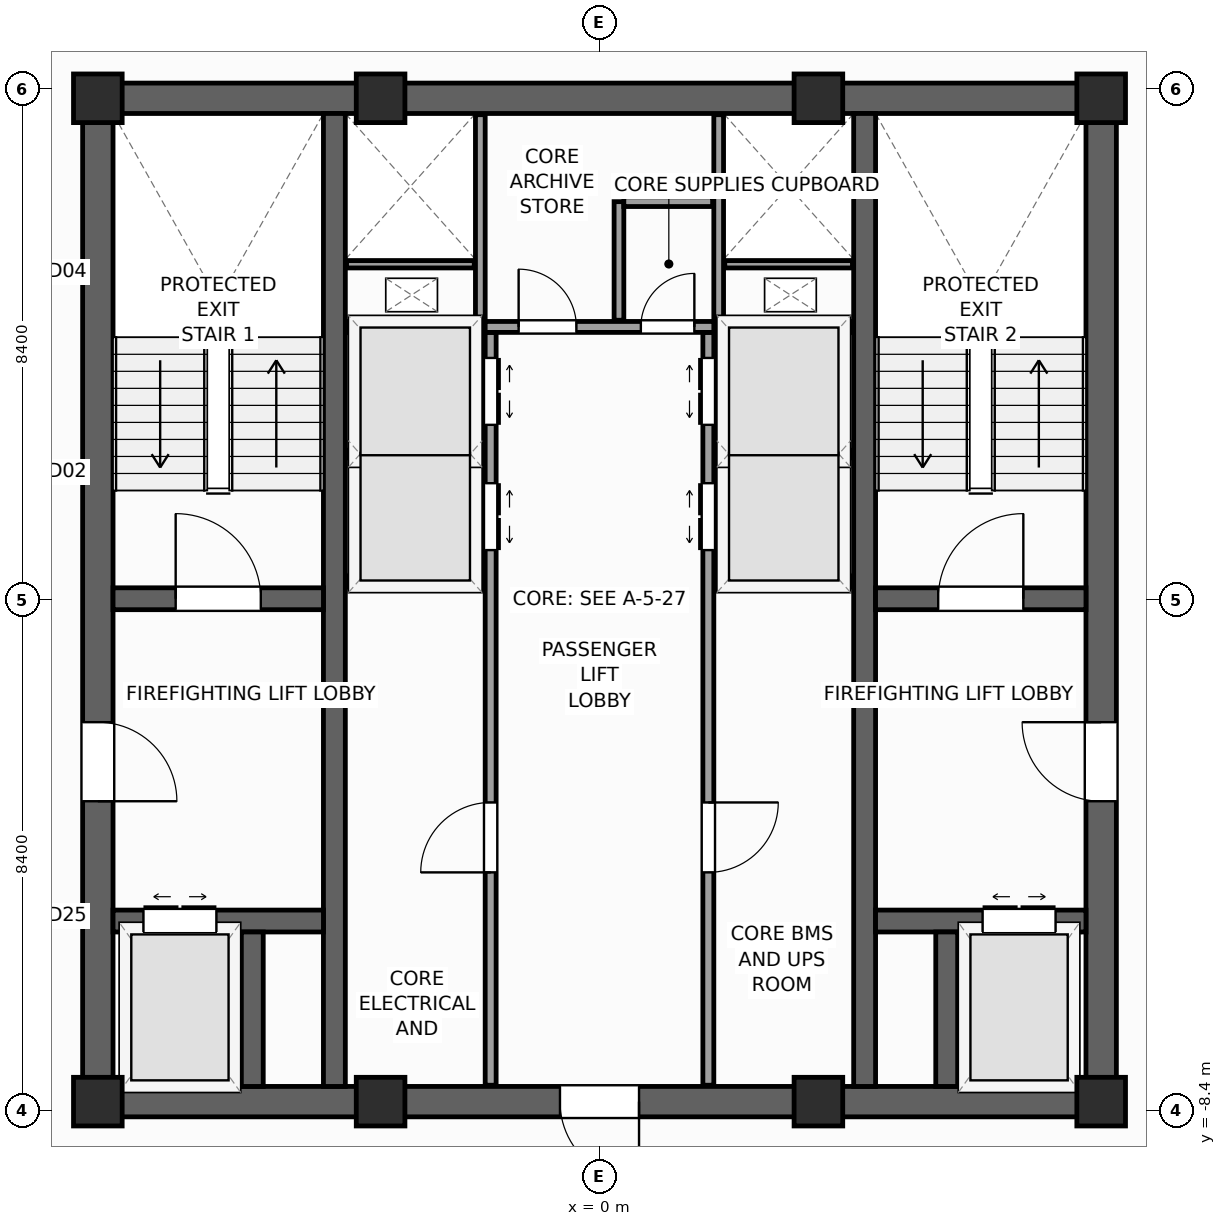
"""IFC4 building model, lengths in metres.
Left out: names, types, materials, properties, quantities, classifications, styles, units other than length and angle.
Written with IfcOpenShell. Run it as: python <this file> out.ifc"""

import sys

from ifc_helpers import new_model, si_unit, direction, frame, frame_2d, origin, origin_2d, place, context, subcontext, project, spatial, rectangle, extrude, source, transform, mapped, element, fill, save


model = new_model("IFC4")
c1 = context("Model", 3, precision=1e-05, world=origin(), true_north=direction((0.0, 1.0)))
c2 = subcontext(c1, "Body", "Model", "MODEL_VIEW")
j1 = project(units=[si_unit("LENGTHUNIT", "METRE"), si_unit("PLANEANGLEUNIT", "RADIAN")], contexts=[c1])
p1 = place(None, origin())
s1 = spatial("IfcSite", under=j1, at=p1, CompositionType="ELEMENT")
p2 = place(p1, origin())
s2 = spatial("IfcBuilding", under=s1, at=p2, CompositionType="ELEMENT")
p3 = place(p2, frame((0.0, 0.0, 297.6)))
s3 = spatial("IfcBuildingStorey", under=s2, at=p3, CompositionType="ELEMENT", Elevation=297.6)
p4 = place(p3, frame((-8.5, -8.25, 0.0), z_axis=(0.0, 0.0, 1.0), x_axis=(1.0, 0.0, 0.0)))
e1 = element("IfcWall", 1, at=p4, inside=s3, PredefinedType="SHEAR", context=c2, shape_type="SweptSolid", body=[
    extrude(rectangle(XDim=17.0, YDim=0.5, at=frame_2d((8.5, 0.0))), origin(), (0.0, 0.0, 1.0), 3.6),
])
p5 = place(p4, frame((7.85, 0.0, 0.0)))
e2 = element("IfcOpeningElement", 2, at=p5, cuts=e1, PredefinedType="OPENING", context=c2, shape_type="SweptSolid", body=[
    extrude(rectangle(XDim=1.3, YDim=2.2, at=frame_2d((0.65, 1.1))), frame((0.0, 0.26, 0.0), z_axis=(0.0, -1.0, 0.0), x_axis=(1.0, 0.0, 0.0)), (0.0, 0.0, 1.0), 0.52),
])
p6 = place(p3, frame((-8.5, 8.25, 0.0), z_axis=(0.0, 0.0, 1.0), x_axis=(1.0, 0.0, 0.0)))
e3 = element("IfcWall", 3, at=p6, inside=s3, PredefinedType="SHEAR", context=c2, shape_type="SweptSolid", body=[
    extrude(rectangle(XDim=17.0, YDim=0.5, at=frame_2d((8.5, 0.0))), origin(), (0.0, 0.0, 1.0), 3.6),
])
p7 = place(p3, frame((-8.25, -8.0, 0.0), z_axis=(0.0, 0.0, 1.0), x_axis=(0.0, 1.0, 0.0)))
e4 = element("IfcWall", 4, at=p7, inside=s3, PredefinedType="SHEAR", context=c2, shape_type="SweptSolid", body=[
    extrude(rectangle(XDim=16.0, YDim=0.5, at=frame_2d((8.0, 0.0))), origin(), (0.0, 0.0, 1.0), 3.6),
])
p8 = place(p7, frame((4.69, 0.0, 0.0)))
e5 = element("IfcOpeningElement", 5, at=p8, cuts=e4, PredefinedType="OPENING", context=c2, shape_type="SweptSolid", body=[
    extrude(rectangle(XDim=1.3, YDim=2.2, at=frame_2d((0.65, 1.1))), frame((0.0, 0.26, 0.0), z_axis=(0.0, -1.0, 0.0), x_axis=(1.0, 0.0, 0.0)), (0.0, 0.0, 1.0), 0.52),
])
p9 = place(p3, frame((8.25, -8.0, 0.0), z_axis=(0.0, 0.0, 1.0), x_axis=(0.0, 1.0, 0.0)))
e6 = element("IfcWall", 6, at=p9, inside=s3, PredefinedType="SHEAR", context=c2, shape_type="SweptSolid", body=[
    extrude(rectangle(XDim=16.0, YDim=0.5, at=frame_2d((8.0, 0.0))), origin(), (0.0, 0.0, 1.0), 3.6),
])
p10 = place(p9, frame((4.69, 0.0, 0.0)))
e7 = element("IfcOpeningElement", 7, at=p10, cuts=e6, PredefinedType="OPENING", context=c2, shape_type="SweptSolid", body=[
    extrude(rectangle(XDim=1.3, YDim=2.2, at=frame_2d((0.65, 1.1))), frame((0.0, 0.26, 0.0), z_axis=(0.0, -1.0, 0.0), x_axis=(1.0, 0.0, 0.0)), (0.0, 0.0, 1.0), 0.52),
])
for number, where, z_axis, x_axis in (
    (8, (-4.36, -8.0, 0.0), (0.0, 0.0, 1.0), (0.0, 1.0, 0.0)),
    (9, (4.36, -8.0, 0.0), (0.0, 0.0, 1.0), (0.0, 1.0, 0.0)),
):
    element("IfcWall", number, at=place(p3, frame(where, z_axis=z_axis, x_axis=x_axis)), inside=s3, PredefinedType="SHEAR", context=c2, shape_type="SweptSolid", body=[
        extrude(rectangle(XDim=16.0, YDim=0.36, at=frame_2d((8.0, 0.0))), origin(), (0.0, 0.0, 1.0), 3.6),
    ])
p11 = place(p3, frame((-8.0, 0.02, 0.0), z_axis=(0.0, 0.0, 1.0), x_axis=(1.0, 0.0, 0.0)))
e10 = element("IfcWall", 10, at=p11, inside=s3, PredefinedType="SHEAR", context=c2, shape_type="SweptSolid", body=[
    extrude(rectangle(XDim=3.46, YDim=0.36, at=frame_2d((1.73, 0.0))), origin(), (0.0, 0.0, 1.0), 3.6),
])
p12 = place(p11, frame((1.03, 0.0, 0.0)))
e11 = element("IfcOpeningElement", 11, at=p12, cuts=e10, PredefinedType="OPENING", context=c2, shape_type="SweptSolid", body=[
    extrude(rectangle(XDim=1.4, YDim=2.2, at=frame_2d((0.7, 1.1))), frame((0.0, 0.19, 0.0), z_axis=(0.0, -1.0, 0.0), x_axis=(1.0, 0.0, 0.0)), (0.0, 0.0, 1.0), 0.38),
])
p13 = place(p3, frame((4.54, 0.02, 0.0), z_axis=(0.0, 0.0, 1.0), x_axis=(1.0, 0.0, 0.0)))
e12 = element("IfcWall", 12, at=p13, inside=s3, PredefinedType="SHEAR", context=c2, shape_type="SweptSolid", body=[
    extrude(rectangle(XDim=3.46, YDim=0.36, at=frame_2d((1.73, 0.0))), origin(), (0.0, 0.0, 1.0), 3.6),
])
p14 = place(p13, frame((1.03, 0.0, 0.0)))
e13 = element("IfcOpeningElement", 13, at=p14, cuts=e12, PredefinedType="OPENING", context=c2, shape_type="SweptSolid", body=[
    extrude(rectangle(XDim=1.4, YDim=2.2, at=frame_2d((0.7, 1.1))), frame((0.0, 0.19, 0.0), z_axis=(0.0, -1.0, 0.0), x_axis=(1.0, 0.0, 0.0)), (0.0, 0.0, 1.0), 0.38),
])
p15 = place(p3, frame((-8.0, -5.28, 0.0), z_axis=(0.0, 0.0, 1.0), x_axis=(1.0, 0.0, 0.0)))
e14 = element("IfcWall", 14, at=p15, inside=s3, PredefinedType="SHEAR", context=c2, shape_type="SweptSolid", body=[
    extrude(rectangle(XDim=3.46, YDim=0.36, at=frame_2d((1.73, 0.0))), origin(), (0.0, 0.0, 1.0), 3.6),
])
p16 = place(p15, frame((0.5, 0.0, 0.0)))
e15 = element("IfcOpeningElement", 15, at=p16, cuts=e14, PredefinedType="OPENING", context=c2, shape_type="SweptSolid", body=[
    extrude(rectangle(XDim=1.2, YDim=2.25, at=frame_2d((0.6, 1.125))), frame((0.0, 0.19, 0.0), z_axis=(0.0, -1.0, 0.0), x_axis=(1.0, 0.0, 0.0)), (0.0, 0.0, 1.0), 0.38),
])
p17 = place(p3, frame((4.54, -5.28, 0.0), z_axis=(0.0, 0.0, 1.0), x_axis=(1.0, 0.0, 0.0)))
e16 = element("IfcWall", 16, at=p17, inside=s3, PredefinedType="SHEAR", context=c2, shape_type="SweptSolid", body=[
    extrude(rectangle(XDim=3.46, YDim=0.36, at=frame_2d((1.73, 0.0))), origin(), (0.0, 0.0, 1.0), 3.6),
])
p18 = place(p17, frame((1.76, 0.0, 0.0)))
e17 = element("IfcOpeningElement", 17, at=p18, cuts=e16, PredefinedType="OPENING", context=c2, shape_type="SweptSolid", body=[
    extrude(rectangle(XDim=1.2, YDim=2.25, at=frame_2d((0.6, 1.125))), frame((0.0, 0.19, 0.0), z_axis=(0.0, -1.0, 0.0), x_axis=(1.0, 0.0, 0.0)), (0.0, 0.0, 1.0), 0.38),
])
for number, where, z_axis, x_axis in (
    (18, (-5.71, -8.0, 0.0), (0.0, 0.0, 1.0), (0.0, 1.0, 0.0)),
    (19, (5.71, -8.0, 0.0), (0.0, 0.0, 1.0), (0.0, 1.0, 0.0)),
):
    element("IfcWall", number, at=place(p3, frame(where, z_axis=z_axis, x_axis=x_axis)), inside=s3, PredefinedType="SHEAR", context=c2, shape_type="SweptSolid", body=[
        extrude(rectangle(XDim=2.54, YDim=0.36, at=frame_2d((1.27, 0.0))), origin(), (0.0, 0.0, 1.0), 3.6),
    ])
m1 = source(origin(), c2, "Body", "SweptSolid", [
    extrude(rectangle(XDim=0.8, YDim=0.8, at=origin_2d()), origin(), (0.0, 0.0, 1.0), 3.6),
])
for number, where, z_axis, x_axis in (
    (20, (-8.25, -8.25, 0.0), (0.0, 0.0, 1.0), (1.0, 0.0, 0.0)),
    (21, (8.25, -8.25, 0.0), (0.0, 0.0, 1.0), (1.0, 0.0, 0.0)),
    (22, (8.25, 8.25, 0.0), (0.0, 0.0, 1.0), (1.0, 0.0, 0.0)),
    (23, (-8.25, 8.25, 0.0), (0.0, 0.0, 1.0), (1.0, 0.0, 0.0)),
    (24, (-3.6, -8.25, 0.0), (0.0, 0.0, 1.0), (1.0, 0.0, 0.0)),
    (25, (3.6, -8.25, 0.0), (0.0, 0.0, 1.0), (1.0, 0.0, 0.0)),
    (26, (-3.6, 8.25, 0.0), (0.0, 0.0, 1.0), (1.0, 0.0, 0.0)),
    (27, (3.6, 8.25, 0.0), (0.0, 0.0, 1.0), (1.0, 0.0, 0.0)),
):
    element("IfcColumn", number, at=place(p3, frame(where, z_axis=z_axis, x_axis=x_axis)), inside=s3, PredefinedType="PILASTER", context=c2, shape_type="MappedRepresentation", body=[
        mapped(m1, transform((0.0, 0.0, 0.0), scale=1.0)),
    ])
p19 = place(p3, frame((-1.79, -7.98, 0.0), z_axis=(0.0, 0.0, 1.0), x_axis=(0.0, 1.0, 0.0)))
e28 = element("IfcWall", 28, at=p19, inside=s3, PredefinedType="PARTITIONING", context=c2, shape_type="SweptSolid", body=[
    extrude(rectangle(XDim=12.38, YDim=0.18, at=frame_2d((6.19, 0.0))), origin(), (0.0, 0.0, 1.0), 3.35),
])
p20 = place(p19, frame((8.8, 0.0, 0.0)))
e29 = element("IfcOpeningElement", 29, at=p20, cuts=e28, PredefinedType="OPENING", context=c2, shape_type="SweptSolid", body=[
    extrude(rectangle(XDim=1.1, YDim=2.2, at=frame_2d((0.55, 1.1))), frame((0.0, 0.1, 0.0), z_axis=(0.0, -1.0, 0.0), x_axis=(1.0, 0.0, 0.0)), (0.0, 0.0, 1.0), 0.2),
])
p21 = place(p19, frame((10.86, 0.0, 0.0)))
e30 = element("IfcOpeningElement", 30, at=p21, cuts=e28, PredefinedType="OPENING", context=c2, shape_type="SweptSolid", body=[
    extrude(rectangle(XDim=1.1, YDim=2.2, at=frame_2d((0.55, 1.1))), frame((0.0, 0.1, 0.0), z_axis=(0.0, -1.0, 0.0), x_axis=(1.0, 0.0, 0.0)), (0.0, 0.0, 1.0), 0.2),
])
p22 = place(p19, frame((3.5, 0.0, 0.0)))
e31 = element("IfcOpeningElement", 31, at=p22, cuts=e28, PredefinedType="OPENING", context=c2, shape_type="SweptSolid", body=[
    extrude(rectangle(XDim=1.15, YDim=2.25, at=frame_2d((0.575, 1.125))), frame((0.0, 0.1, 0.0), z_axis=(0.0, -1.0, 0.0), x_axis=(1.0, 0.0, 0.0)), (0.0, 0.0, 1.0), 0.2),
])
p23 = place(p3, frame((1.79, -7.98, 0.0), z_axis=(0.0, 0.0, 1.0), x_axis=(0.0, 1.0, 0.0)))
e32 = element("IfcWall", 32, at=p23, inside=s3, PredefinedType="PARTITIONING", context=c2, shape_type="SweptSolid", body=[
    extrude(rectangle(XDim=12.38, YDim=0.18, at=frame_2d((6.19, 0.0))), origin(), (0.0, 0.0, 1.0), 3.35),
])
p24 = place(p23, frame((8.8, 0.0, 0.0)))
e33 = element("IfcOpeningElement", 33, at=p24, cuts=e32, PredefinedType="OPENING", context=c2, shape_type="SweptSolid", body=[
    extrude(rectangle(XDim=1.1, YDim=2.2, at=frame_2d((0.55, 1.1))), frame((0.0, 0.1, 0.0), z_axis=(0.0, -1.0, 0.0), x_axis=(1.0, 0.0, 0.0)), (0.0, 0.0, 1.0), 0.2),
])
p25 = place(p23, frame((10.86, 0.0, 0.0)))
e34 = element("IfcOpeningElement", 34, at=p25, cuts=e32, PredefinedType="OPENING", context=c2, shape_type="SweptSolid", body=[
    extrude(rectangle(XDim=1.1, YDim=2.2, at=frame_2d((0.55, 1.1))), frame((0.0, 0.1, 0.0), z_axis=(0.0, -1.0, 0.0), x_axis=(1.0, 0.0, 0.0)), (0.0, 0.0, 1.0), 0.2),
])
p26 = place(p23, frame((3.5, 0.0, 0.0)))
e35 = element("IfcOpeningElement", 35, at=p26, cuts=e32, PredefinedType="OPENING", context=c2, shape_type="SweptSolid", body=[
    extrude(rectangle(XDim=1.15, YDim=2.25, at=frame_2d((0.575, 1.125))), frame((0.0, 0.1, 0.0), z_axis=(0.0, -1.0, 0.0), x_axis=(1.0, 0.0, 0.0)), (0.0, 0.0, 1.0), 0.2),
])
p27 = place(p3, frame((-1.88, 4.49, 0.0), z_axis=(0.0, 0.0, 1.0), x_axis=(1.0, 0.0, 0.0)))
e36 = element("IfcWall", 36, at=p27, inside=s3, PredefinedType="PARTITIONING", context=c2, shape_type="SweptSolid", body=[
    extrude(rectangle(XDim=3.76, YDim=0.18, at=frame_2d((1.88, 0.0))), origin(), (0.0, 0.0, 1.0), 3.35),
])
p28 = place(p27, frame((0.55, 0.0, 0.0)))
e37 = element("IfcOpeningElement", 37, at=p28, cuts=e36, PredefinedType="OPENING", context=c2, shape_type="SweptSolid", body=[
    extrude(rectangle(XDim=0.95, YDim=2.1, at=frame_2d((0.475, 1.05))), frame((0.0, 0.1, 0.0), z_axis=(0.0, -1.0, 0.0), x_axis=(1.0, 0.0, 0.0)), (0.0, 0.0, 1.0), 0.2),
])
p29 = place(p27, frame((2.56, 0.0, 0.0)))
e38 = element("IfcOpeningElement", 38, at=p29, cuts=e36, PredefinedType="OPENING", context=c2, shape_type="SweptSolid", body=[
    extrude(rectangle(XDim=0.88, YDim=2.1, at=frame_2d((0.44, 1.05))), frame((0.0, 0.1, 0.0), z_axis=(0.0, -1.0, 0.0), x_axis=(1.0, 0.0, 0.0)), (0.0, 0.0, 1.0), 0.2),
])
for number, where, z_axis, x_axis in (
    (39, (-4.17, 0.3, 0.0), (0.0, 0.0, 1.0), (1.0, 0.0, 0.0)),
    (40, (1.89, 0.3, 0.0), (0.0, 0.0, 1.0), (1.0, 0.0, 0.0)),
    (41, (-4.17, 4.49, 0.0), (0.0, 0.0, 1.0), (1.0, 0.0, 0.0)),
    (42, (1.89, 4.49, 0.0), (0.0, 0.0, 1.0), (1.0, 0.0, 0.0)),
):
    element("IfcWall", number, at=place(p3, frame(where, z_axis=z_axis, x_axis=x_axis)), inside=s3, PredefinedType="PARTITIONING", context=c2, shape_type="SweptSolid", body=[
        extrude(rectangle(XDim=2.28, YDim=0.18, at=frame_2d((1.14, 0.0))), origin(), (0.0, 0.0, 1.0), 3.35),
    ])
for number, where, z_axis, x_axis in (
    (43, (-4.16, 2.4, 0.0), (0.0, 0.0, 1.0), (1.0, 0.0, 0.0)),
    (44, (1.9, 2.4, 0.0), (0.0, 0.0, 1.0), (1.0, 0.0, 0.0)),
):
    element("IfcWall", number, at=place(p3, frame(where, z_axis=z_axis, x_axis=x_axis)), inside=s3, PredefinedType="PARTITIONING", context=c2, shape_type="SweptSolid", body=[
        extrude(rectangle(XDim=2.26, YDim=0.12, at=frame_2d((1.13, 0.0))), origin(), (0.0, 0.0, 1.0), 3.35),
    ])
for number, where, z_axis, x_axis in (
    (45, (-1.96, 4.58, 0.0), (0.0, 0.0, 1.0), (0.0, 1.0, 0.0)),
    (46, (1.96, 4.58, 0.0), (0.0, 0.0, 1.0), (0.0, 1.0, 0.0)),
):
    element("IfcWall", number, at=place(p3, frame(where, z_axis=z_axis, x_axis=x_axis)), inside=s3, PredefinedType="PARTITIONING", context=c2, shape_type="SweptSolid", body=[
        extrude(rectangle(XDim=3.4, YDim=0.16, at=frame_2d((1.7, 0.0))), origin(), (0.0, 0.0, 1.0), 3.35),
    ])
for number, where, z_axis, x_axis in (
    (47, (-4.16, 5.52, 0.0), (0.0, 0.0, 1.0), (1.0, 0.0, 0.0)),
    (48, (2.06, 5.52, 0.0), (0.0, 0.0, 1.0), (1.0, 0.0, 0.0)),
):
    element("IfcWall", number, at=place(p3, frame(where, z_axis=z_axis, x_axis=x_axis)), inside=s3, PredefinedType="PARTITIONING", context=c2, shape_type="SweptSolid", body=[
        extrude(rectangle(XDim=2.1, YDim=0.12, at=frame_2d((1.05, 0.0))), origin(), (0.0, 0.0, 1.0), 3.35),
    ])
p30 = place(p3, frame((0.32, 4.6, 0.0), z_axis=(0.0, 0.0, 1.0), x_axis=(0.0, 1.0, 0.0)))
e49 = element("IfcWall", 49, at=p30, inside=s3, PredefinedType="PARTITIONING", context=c2, shape_type="SweptSolid", body=[
    extrude(rectangle(XDim=1.95, YDim=0.16, at=frame_2d((0.975, 0.0))), origin(), (0.0, 0.0, 1.0), 3.35),
])
p31 = place(p3, frame((0.4, 6.55, 0.0), z_axis=(0.0, 0.0, 1.0), x_axis=(1.0, 0.0, 0.0)))
e50 = element("IfcWall", 50, at=p31, inside=s3, PredefinedType="PARTITIONING", context=c2, shape_type="SweptSolid", body=[
    extrude(rectangle(XDim=1.46, YDim=0.16, at=frame_2d((0.73, 0.0))), origin(), (0.0, 0.0, 1.0), 3.35),
])
m2 = source(origin(), c2, "Body", "SweptSolid", [
    extrude(rectangle(XDim=1.4, YDim=2.2, at=frame_2d((0.7, 1.1))), frame((0.0, 0.025, 0.0), z_axis=(0.0, -1.0, 0.0), x_axis=(1.0, 0.0, 0.0)), (0.0, 0.0, 1.0), 0.05),
])
p32 = place(p12, origin())
e51 = element("IfcDoor", 51, at=p32, inside=s3, OperationType="SINGLE_SWING_LEFT", PredefinedType="DOOR", context=c2, shape_type="MappedRepresentation", body=[
    mapped(m2, transform((0.0, 0.0, 0.0), scale=1.0)),
])
fill(e11, e51)
p33 = place(p14, origin())
e52 = element("IfcDoor", 52, at=p33, inside=s3, OperationType="SINGLE_SWING_RIGHT", PredefinedType="DOOR", context=c2, shape_type="MappedRepresentation", body=[
    mapped(m2, transform((0.0, 0.0, 0.0), scale=1.0)),
])
fill(e13, e52)
m3 = source(origin(), c2, "Body", "SweptSolid", [
    extrude(rectangle(XDim=1.3, YDim=2.2, at=frame_2d((0.65, 1.1))), frame((0.0, 0.025, 0.0), z_axis=(0.0, -1.0, 0.0), x_axis=(1.0, 0.0, 0.0)), (0.0, 0.0, 1.0), 0.05),
])
p34 = place(p8, frame((1.3, 0.0, 0.0), z_axis=(0.0, 0.0, 1.0), x_axis=(-1.0, 0.0, 0.0)))
e53 = element("IfcDoor", 53, at=p34, inside=s3, OperationType="SINGLE_SWING_LEFT", PredefinedType="DOOR", context=c2, shape_type="MappedRepresentation", body=[
    mapped(m3, transform((0.0, 0.0, 0.0), scale=1.0)),
])
fill(e5, e53)
p35 = place(p10, origin())
e54 = element("IfcDoor", 54, at=p35, inside=s3, OperationType="SINGLE_SWING_RIGHT", PredefinedType="DOOR", context=c2, shape_type="MappedRepresentation", body=[
    mapped(m3, transform((0.0, 0.0, 0.0), scale=1.0)),
])
fill(e7, e54)
p36 = place(p5, frame((1.3, 0.0, 0.0), z_axis=(0.0, 0.0, 1.0), x_axis=(-1.0, 0.0, 0.0)))
e55 = element("IfcDoor", 55, at=p36, inside=s3, OperationType="SINGLE_SWING_RIGHT", PredefinedType="DOOR", context=c2, shape_type="MappedRepresentation", body=[
    mapped(m3, transform((0.0, 0.0, 0.0), scale=1.0)),
])
fill(e2, e55)
m4 = source(origin(), c2, "Body", "SweptSolid", [
    extrude(rectangle(XDim=1.2, YDim=2.25, at=frame_2d((0.6, 1.125))), frame((0.0, 0.025, 0.0), z_axis=(0.0, -1.0, 0.0), x_axis=(1.0, 0.0, 0.0)), (0.0, 0.0, 1.0), 0.05),
])
p37 = place(p16, origin())
e56 = element("IfcDoor", 56, at=p37, inside=s3, OperationType="DOUBLE_DOOR_SLIDING", PredefinedType="DOOR", context=c2, shape_type="MappedRepresentation", body=[
    mapped(m4, transform((0.0, 0.0, 0.0), scale=1.0)),
])
fill(e15, e56)
p38 = place(p18, origin())
e57 = element("IfcDoor", 57, at=p38, inside=s3, OperationType="DOUBLE_DOOR_SLIDING", PredefinedType="DOOR", context=c2, shape_type="MappedRepresentation", body=[
    mapped(m4, transform((0.0, 0.0, 0.0), scale=1.0)),
])
fill(e17, e57)
m5 = source(origin(), c2, "Body", "SweptSolid", [
    extrude(rectangle(XDim=1.1, YDim=2.2, at=frame_2d((0.55, 1.1))), frame((0.0, 0.025, 0.0), z_axis=(0.0, -1.0, 0.0), x_axis=(1.0, 0.0, 0.0)), (0.0, 0.0, 1.0), 0.05),
])
p39 = place(p20, frame((1.1, 0.0, 0.0), z_axis=(0.0, 0.0, 1.0), x_axis=(-1.0, 0.0, 0.0)))
e58 = element("IfcDoor", 58, at=p39, inside=s3, OperationType="DOUBLE_DOOR_SLIDING", PredefinedType="DOOR", context=c2, shape_type="MappedRepresentation", body=[
    mapped(m5, transform((0.0, 0.0, 0.0), scale=1.0)),
])
fill(e29, e58)
p40 = place(p21, frame((1.1, 0.0, 0.0), z_axis=(0.0, 0.0, 1.0), x_axis=(-1.0, 0.0, 0.0)))
e59 = element("IfcDoor", 59, at=p40, inside=s3, OperationType="DOUBLE_DOOR_SLIDING", PredefinedType="DOOR", context=c2, shape_type="MappedRepresentation", body=[
    mapped(m5, transform((0.0, 0.0, 0.0), scale=1.0)),
])
fill(e30, e59)
p41 = place(p24, origin())
e60 = element("IfcDoor", 60, at=p41, inside=s3, OperationType="DOUBLE_DOOR_SLIDING", PredefinedType="DOOR", context=c2, shape_type="MappedRepresentation", body=[
    mapped(m5, transform((0.0, 0.0, 0.0), scale=1.0)),
])
fill(e33, e60)
p42 = place(p25, origin())
e61 = element("IfcDoor", 61, at=p42, inside=s3, OperationType="DOUBLE_DOOR_SLIDING", PredefinedType="DOOR", context=c2, shape_type="MappedRepresentation", body=[
    mapped(m5, transform((0.0, 0.0, 0.0), scale=1.0)),
])
fill(e34, e61)
m6 = source(origin(), c2, "Body", "SweptSolid", [
    extrude(rectangle(XDim=1.15, YDim=2.25, at=frame_2d((0.575, 1.125))), frame((0.0, 0.025, 0.0), z_axis=(0.0, -1.0, 0.0), x_axis=(1.0, 0.0, 0.0)), (0.0, 0.0, 1.0), 0.05),
])
p43 = place(p22, origin())
e62 = element("IfcDoor", 62, at=p43, inside=s3, OperationType="SINGLE_SWING_LEFT", PredefinedType="DOOR", context=c2, shape_type="MappedRepresentation", body=[
    mapped(m6, transform((0.0, 0.0, 0.0), scale=1.0)),
])
fill(e31, e62)
p44 = place(p26, frame((1.15, 0.0, 0.0), z_axis=(0.0, 0.0, 1.0), x_axis=(-1.0, 0.0, 0.0)))
e63 = element("IfcDoor", 63, at=p44, inside=s3, OperationType="SINGLE_SWING_RIGHT", PredefinedType="DOOR", context=c2, shape_type="MappedRepresentation", body=[
    mapped(m6, transform((0.0, 0.0, 0.0), scale=1.0)),
])
fill(e35, e63)
m7 = source(origin(), c2, "Body", "SweptSolid", [
    extrude(rectangle(XDim=0.95, YDim=2.1, at=frame_2d((0.475, 1.05))), frame((0.0, 0.025, 0.0), z_axis=(0.0, -1.0, 0.0), x_axis=(1.0, 0.0, 0.0)), (0.0, 0.0, 1.0), 0.05),
])
p45 = place(p28, origin())
e64 = element("IfcDoor", 64, at=p45, inside=s3, OperationType="SINGLE_SWING_LEFT", PredefinedType="DOOR", context=c2, shape_type="MappedRepresentation", body=[
    mapped(m7, transform((0.0, 0.0, 0.0), scale=1.0)),
])
fill(e37, e64)
m8 = source(origin(), c2, "Body", "SweptSolid", [
    extrude(rectangle(XDim=0.88, YDim=2.1, at=frame_2d((0.44, 1.05))), frame((0.0, 0.025, 0.0), z_axis=(0.0, -1.0, 0.0), x_axis=(1.0, 0.0, 0.0)), (0.0, 0.0, 1.0), 0.05),
])
p46 = place(p29, origin())
e65 = element("IfcDoor", 65, at=p46, inside=s3, OperationType="SINGLE_SWING_RIGHT", PredefinedType="DOOR", context=c2, shape_type="MappedRepresentation", body=[
    mapped(m8, transform((0.0, 0.0, 0.0), scale=1.0)),
])
fill(e38, e65)
save(model, sys.argv[1])
